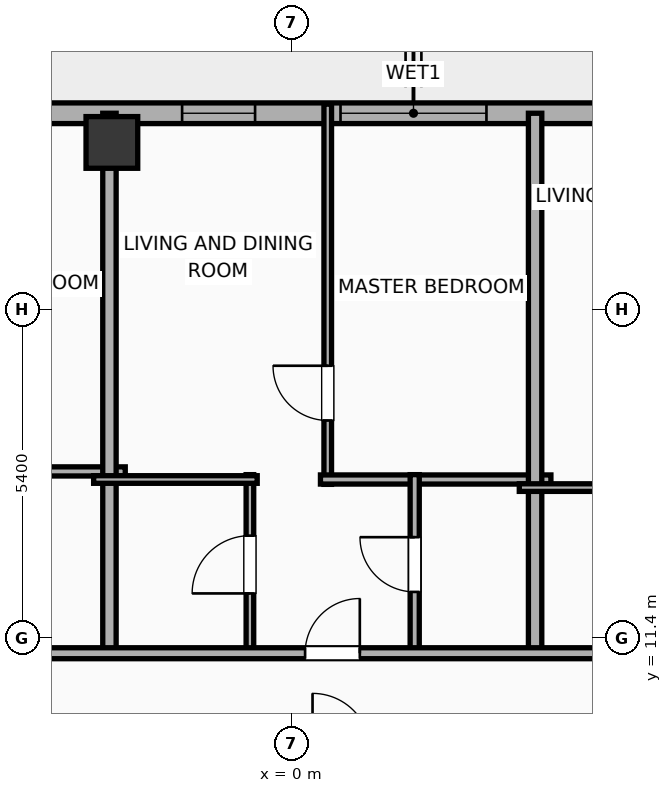
"""IFC4 building model, lengths in metres.
Left out: names, types, materials, properties, quantities, classifications, styles, units other than length and angle.
Written with IfcOpenShell. Run it as: python <this file> out.ifc"""

import sys

from ifc_helpers import new_model, si_unit, direction, frame, frame_2d, origin, origin_2d, place, context, subcontext, project, spatial, rectangle, hollow_rectangle, extrude, element, fill, save


model = new_model("IFC4")
c1 = context("Model", 3, precision=1e-05, world=origin(), true_north=direction((0.0, 1.0)))
c2 = subcontext(c1, "Body", "Model", "MODEL_VIEW")
j1 = project(units=[si_unit("LENGTHUNIT", "METRE"), si_unit("PLANEANGLEUNIT", "RADIAN")], contexts=[c1])
p1 = place(None, origin())
s1 = spatial("IfcSite", under=j1, at=p1, CompositionType="ELEMENT")
p2 = place(p1, origin())
s2 = spatial("IfcBuilding", under=s1, at=p2, CompositionType="ELEMENT")
p3 = place(p2, frame((0.0, 0.0, 231.4)))
s3 = spatial("IfcBuildingStorey", under=s2, at=p3, CompositionType="ELEMENT", Elevation=231.4)
p4 = place(p3, frame((-2.96, 19.55, 0.0), z_axis=(0.0, 0.0, 1.0), x_axis=(1.0, 0.0, 0.0)))
e1 = element("IfcColumn", 1, at=p4, inside=s3, PredefinedType="COLUMN", context=c2, shape_type="SweptSolid", body=[
    extrude(hollow_rectangle(XDim=0.85, YDim=0.85, WallThickness=0.028, at=origin_2d()), origin(), (0.0, 0.0, 1.0), 3.9),
])
p5 = place(p3, frame((-22.783, 20.03, 0.0), z_axis=(0.0, 0.0, 1.0), x_axis=(1.0, 0.0, 0.0)))
e2 = element("IfcWall", 2, at=p5, inside=s3, PredefinedType="ELEMENTEDWALL", context=c2, shape_type="SweptSolid", body=[
    extrude(rectangle(XDim=49.566, YDim=0.34, at=frame_2d((24.783, 0.0))), origin(), (0.0, 0.0, 1.0), 3.65),
])
p6 = place(p5, frame((14.12, 0.0, 0.0)))
e3 = element("IfcOpeningElement", 3, at=p6, cuts=e2, PredefinedType="OPENING", context=c2, shape_type="SweptSolid", body=[
    extrude(rectangle(XDim=1.5, YDim=2.05, at=frame_2d((0.75, 1.025))), frame((0.0, 0.18, 0.0), z_axis=(0.0, -1.0, 0.0), x_axis=(1.0, 0.0, 0.0)), (0.0, 0.0, 1.0), 0.36),
])
p7 = place(p5, frame((6.211, 0.0, 0.75)))
e4 = element("IfcOpeningElement", 4, at=p7, cuts=e2, PredefinedType="OPENING", context=c2, shape_type="SweptSolid", body=[
    extrude(rectangle(XDim=2.4, YDim=2.1, at=frame_2d((1.2, 1.05))), frame((0.0, 0.18, 0.0), z_axis=(0.0, -1.0, 0.0), x_axis=(1.0, 0.0, 0.0)), (0.0, 0.0, 1.0), 0.36),
])
p8 = place(p5, frame((23.583, 0.0, 0.75)))
e5 = element("IfcOpeningElement", 5, at=p8, cuts=e2, PredefinedType="OPENING", context=c2, shape_type="SweptSolid", body=[
    extrude(rectangle(XDim=2.4, YDim=2.1, at=frame_2d((1.2, 1.05))), frame((0.0, 0.18, 0.0), z_axis=(0.0, -1.0, 0.0), x_axis=(1.0, 0.0, 0.0)), (0.0, 0.0, 1.0), 0.36),
])
p9 = place(p5, frame((33.947, 0.0, 0.0)))
e6 = element("IfcOpeningElement", 6, at=p9, cuts=e2, PredefinedType="OPENING", context=c2, shape_type="SweptSolid", body=[
    extrude(rectangle(XDim=1.5, YDim=2.05, at=frame_2d((0.75, 1.025))), frame((0.0, 0.18, 0.0), z_axis=(0.0, -1.0, 0.0), x_axis=(1.0, 0.0, 0.0)), (0.0, 0.0, 1.0), 0.36),
])
p10 = place(p5, frame((2.36, 0.0, 0.75)))
e7 = element("IfcOpeningElement", 7, at=p10, cuts=e2, PredefinedType="OPENING", context=c2, shape_type="SweptSolid", body=[
    extrude(rectangle(XDim=1.2, YDim=2.05, at=frame_2d((0.6, 1.025))), frame((0.0, 0.18, 0.0), z_axis=(0.0, -1.0, 0.0), x_axis=(1.0, 0.0, 0.0)), (0.0, 0.0, 1.0), 0.36),
])
p11 = place(p5, frame((10.598, 0.0, 0.75)))
e8 = element("IfcOpeningElement", 8, at=p11, cuts=e2, PredefinedType="OPENING", context=c2, shape_type="SweptSolid", body=[
    extrude(rectangle(XDim=1.2, YDim=2.05, at=frame_2d((0.6, 1.025))), frame((0.0, 0.18, 0.0), z_axis=(0.0, -1.0, 0.0), x_axis=(1.0, 0.0, 0.0)), (0.0, 0.0, 1.0), 0.36),
])
p12 = place(p5, frame((17.478, 0.0, 0.75)))
e9 = element("IfcOpeningElement", 9, at=p12, cuts=e2, PredefinedType="OPENING", context=c2, shape_type="SweptSolid", body=[
    extrude(rectangle(XDim=1.2, YDim=2.05, at=frame_2d((0.6, 1.025))), frame((0.0, 0.18, 0.0), z_axis=(0.0, -1.0, 0.0), x_axis=(1.0, 0.0, 0.0)), (0.0, 0.0, 1.0), 0.36),
])
p13 = place(p5, frame((20.978, 0.0, 0.75)))
e10 = element("IfcOpeningElement", 10, at=p13, cuts=e2, PredefinedType="OPENING", context=c2, shape_type="SweptSolid", body=[
    extrude(rectangle(XDim=1.2, YDim=2.05, at=frame_2d((0.6, 1.025))), frame((0.0, 0.18, 0.0), z_axis=(0.0, -1.0, 0.0), x_axis=(1.0, 0.0, 0.0)), (0.0, 0.0, 1.0), 0.36),
])
p14 = place(p5, frame((27.758, 0.0, 0.75)))
e11 = element("IfcOpeningElement", 11, at=p14, cuts=e2, PredefinedType="OPENING", context=c2, shape_type="SweptSolid", body=[
    extrude(rectangle(XDim=1.2, YDim=2.05, at=frame_2d((0.6, 1.025))), frame((0.0, 0.18, 0.0), z_axis=(0.0, -1.0, 0.0), x_axis=(1.0, 0.0, 0.0)), (0.0, 0.0, 1.0), 0.36),
])
p15 = place(p5, frame((31.037, 0.0, 0.75)))
e12 = element("IfcOpeningElement", 12, at=p15, cuts=e2, PredefinedType="OPENING", context=c2, shape_type="SweptSolid", body=[
    extrude(rectangle(XDim=1.2, YDim=2.05, at=frame_2d((0.6, 1.025))), frame((0.0, 0.18, 0.0), z_axis=(0.0, -1.0, 0.0), x_axis=(1.0, 0.0, 0.0)), (0.0, 0.0, 1.0), 0.36),
])
p16 = place(p5, frame((37.596, 0.0, 0.75)))
e13 = element("IfcOpeningElement", 13, at=p16, cuts=e2, PredefinedType="OPENING", context=c2, shape_type="SweptSolid", body=[
    extrude(rectangle(XDim=1.2, YDim=2.05, at=frame_2d((0.6, 1.025))), frame((0.0, 0.18, 0.0), z_axis=(0.0, -1.0, 0.0), x_axis=(1.0, 0.0, 0.0)), (0.0, 0.0, 1.0), 0.36),
])
p17 = place(p5, frame((40.876, 0.0, 0.75)))
e14 = element("IfcOpeningElement", 14, at=p17, cuts=e2, PredefinedType="OPENING", context=c2, shape_type="SweptSolid", body=[
    extrude(rectangle(XDim=1.2, YDim=2.05, at=frame_2d((0.6, 1.025))), frame((0.0, 0.18, 0.0), z_axis=(0.0, -1.0, 0.0), x_axis=(1.0, 0.0, 0.0)), (0.0, 0.0, 1.0), 0.36),
])
p18 = place(p5, frame((44.156, 0.0, 0.75)))
e15 = element("IfcOpeningElement", 15, at=p18, cuts=e2, PredefinedType="OPENING", context=c2, shape_type="SweptSolid", body=[
    extrude(rectangle(XDim=1.2, YDim=2.05, at=frame_2d((0.6, 1.025))), frame((0.0, 0.18, 0.0), z_axis=(0.0, -1.0, 0.0), x_axis=(1.0, 0.0, 0.0)), (0.0, 0.0, 1.0), 0.36),
])
p19 = place(p5, frame((46.969, 0.0, 0.75)))
e16 = element("IfcOpeningElement", 16, at=p19, cuts=e2, PredefinedType="OPENING", context=c2, shape_type="SweptSolid", body=[
    extrude(rectangle(XDim=1.2, YDim=2.05, at=frame_2d((0.6, 1.025))), frame((0.0, 0.18, 0.0), z_axis=(0.0, -1.0, 0.0), x_axis=(1.0, 0.0, 0.0)), (0.0, 0.0, 1.0), 0.36),
])
p20 = place(p3, frame((-6.53, 14.14, 0.0), z_axis=(0.0, 0.0, 1.0), x_axis=(1.0, 0.0, 0.0)))
e17 = element("IfcWall", 17, at=p20, inside=s3, PredefinedType="PLUMBINGWALL", context=c2, shape_type="SweptSolid", body=[
    extrude(rectangle(XDim=3.79, YDim=0.15, at=frame_2d((1.895, 0.0))), origin(), (0.0, 0.0, 1.0), 3.65),
])
p21 = place(p3, frame((-3.0, 11.07, 0.0), z_axis=(0.0, 0.0, 1.0), x_axis=(0.0, 1.0, 0.0)))
e18 = element("IfcWall", 18, at=p21, inside=s3, PredefinedType="PARTITIONING", context=c2, shape_type="SweptSolid", body=[
    extrude(rectangle(XDim=8.96, YDim=0.22, at=frame_2d((4.48, 0.0))), origin(), (0.0, 0.0, 1.0), 3.09),
])
p22 = place(p3, frame((0.59, 13.927, 0.0), z_axis=(0.0, 0.0, 1.0), x_axis=(0.0, 1.0, 0.0)))
e19 = element("IfcWall", 19, at=p22, inside=s3, PredefinedType="PARTITIONING", context=c2, shape_type="SweptSolid", body=[
    extrude(rectangle(XDim=6.253, YDim=0.125, at=frame_2d((3.126, 0.0))), origin(), (0.0, 0.0, 1.0), 3.65),
])
p23 = place(p22, frame((1.051, 0.0, 0.0)))
e20 = element("IfcOpeningElement", 20, at=p23, cuts=e19, PredefinedType="OPENING", context=c2, shape_type="SweptSolid", body=[
    extrude(rectangle(XDim=0.9, YDim=2.05, at=frame_2d((0.45, 1.025))), frame((0.0, 0.073, 0.0), z_axis=(0.0, -1.0, 0.0), x_axis=(1.0, 0.0, 0.0)), (0.0, 0.0, 1.0), 0.145),
])
p24 = place(p3, frame((0.47, 14.007, 0.0), z_axis=(0.0, 0.0, 1.0), x_axis=(1.0, 0.0, 0.0)))
e21 = element("IfcWall", 21, at=p24, inside=s3, PredefinedType="PLUMBINGWALL", context=c2, shape_type="SweptSolid", body=[
    extrude(rectangle(XDim=3.79, YDim=0.15, at=frame_2d((1.895, 0.0))), origin(), (0.0, 0.0, 1.0), 3.65),
])
p25 = place(p3, frame((-0.69, 11.13, 0.0), z_axis=(0.0, 0.0, 1.0), x_axis=(0.0, 1.0, 0.0)))
e22 = element("IfcWall", 22, at=p25, inside=s3, PredefinedType="PARTITIONING", context=c2, shape_type="SweptSolid", body=[
    extrude(rectangle(XDim=2.957, YDim=0.125, at=frame_2d((1.479, 0.0))), origin(), (0.0, 0.0, 1.0), 3.65),
])
p26 = place(p25, frame((1.003, 0.0, 0.0)))
e23 = element("IfcOpeningElement", 23, at=p26, cuts=e22, PredefinedType="OPENING", context=c2, shape_type="SweptSolid", body=[
    extrude(rectangle(XDim=0.95, YDim=2.05, at=frame_2d((0.475, 1.025))), frame((0.0, 0.073, 0.0), z_axis=(0.0, -1.0, 0.0), x_axis=(1.0, 0.0, 0.0)), (0.0, 0.0, 1.0), 0.145),
])
p27 = place(p3, frame((-3.26, 14.007, 0.0), z_axis=(0.0, 0.0, 1.0), x_axis=(1.0, 0.0, 0.0)))
e24 = element("IfcWall", 24, at=p27, inside=s3, PredefinedType="PARTITIONING", context=c2, shape_type="SweptSolid", body=[
    extrude(rectangle(XDim=2.69, YDim=0.125, at=frame_2d((1.345, 0.0))), origin(), (0.0, 0.0, 1.0), 3.65),
])
p28 = place(p3, frame((2.02, 11.13, 0.0), z_axis=(0.0, 0.0, 1.0), x_axis=(0.0, 1.0, 0.0)))
e25 = element("IfcWall", 25, at=p28, inside=s3, PredefinedType="PLUMBINGWALL", context=c2, shape_type="SweptSolid", body=[
    extrude(rectangle(XDim=2.957, YDim=0.15, at=frame_2d((1.479, 0.0))), origin(), (0.0, 0.0, 1.0), 3.65),
])
p29 = place(p28, frame((1.029, 0.0, 0.0)))
e26 = element("IfcOpeningElement", 26, at=p29, cuts=e25, PredefinedType="OPENING", context=c2, shape_type="SweptSolid", body=[
    extrude(rectangle(XDim=0.9, YDim=2.05, at=frame_2d((0.45, 1.025))), frame((0.0, 0.085, 0.0), z_axis=(0.0, -1.0, 0.0), x_axis=(1.0, 0.0, 0.0)), (0.0, 0.0, 1.0), 0.17),
])
p30 = place(p3, frame((4.0, 11.07, 0.0), z_axis=(0.0, 0.0, 1.0), x_axis=(0.0, 1.0, 0.0)))
e27 = element("IfcWall", 27, at=p30, inside=s3, PredefinedType="PARTITIONING", context=c2, shape_type="SweptSolid", body=[
    extrude(rectangle(XDim=8.96, YDim=0.22, at=frame_2d((4.48, 0.0))), origin(), (0.0, 0.0, 1.0), 3.65),
])
p31 = place(p3, frame((3.74, 13.874, 0.0), z_axis=(0.0, 0.0, 1.0), x_axis=(1.0, 0.0, 0.0)))
e28 = element("IfcWall", 28, at=p31, inside=s3, PredefinedType="PARTITIONING", context=c2, shape_type="SweptSolid", body=[
    extrude(rectangle(XDim=2.69, YDim=0.125, at=frame_2d((1.345, 0.0))), origin(), (0.0, 0.0, 1.0), 3.65),
])
p32 = place(p3, frame((-26.23, 11.15, 0.0), z_axis=(0.0, 0.0, 1.0), x_axis=(1.0, 0.0, 0.0)))
e29 = element("IfcWall", 29, at=p32, inside=s3, PredefinedType="PARTITIONING", context=c2, shape_type="SweptSolid", body=[
    extrude(rectangle(XDim=56.46, YDim=0.18, at=frame_2d((28.23, 0.0))), origin(), (0.0, 0.0, 1.0), 3.65),
])
p33 = place(p32, frame((3.614, 0.0, 0.0)))
e30 = element("IfcOpeningElement", 30, at=p33, cuts=e29, PredefinedType="OPENING", context=c2, shape_type="SweptSolid", body=[
    extrude(rectangle(XDim=1.15, YDim=2.05, at=frame_2d((0.575, 1.025))), frame((0.0, 0.1, 0.0), z_axis=(0.0, -1.0, 0.0), x_axis=(1.0, 0.0, 0.0)), (0.0, 0.0, 1.0), 0.2),
])
p34 = place(p32, frame((11.761, 0.0, 0.0)))
e31 = element("IfcOpeningElement", 31, at=p34, cuts=e29, PredefinedType="OPENING", context=c2, shape_type="SweptSolid", body=[
    extrude(rectangle(XDim=1.15, YDim=2.05, at=frame_2d((0.575, 1.025))), frame((0.0, 0.1, 0.0), z_axis=(0.0, -1.0, 0.0), x_axis=(1.0, 0.0, 0.0)), (0.0, 0.0, 1.0), 0.2),
])
p35 = place(p32, frame((19.447, 0.0, 0.0)))
e32 = element("IfcOpeningElement", 32, at=p35, cuts=e29, PredefinedType="OPENING", context=c2, shape_type="SweptSolid", body=[
    extrude(rectangle(XDim=0.9, YDim=2.05, at=frame_2d((0.45, 1.025))), frame((0.0, 0.1, 0.0), z_axis=(0.0, -1.0, 0.0), x_axis=(1.0, 0.0, 0.0)), (0.0, 0.0, 1.0), 0.2),
])
p36 = place(p32, frame((26.448, 0.0, 0.0)))
e33 = element("IfcOpeningElement", 33, at=p36, cuts=e29, PredefinedType="OPENING", context=c2, shape_type="SweptSolid", body=[
    extrude(rectangle(XDim=0.9, YDim=2.05, at=frame_2d((0.45, 1.025))), frame((0.0, 0.1, 0.0), z_axis=(0.0, -1.0, 0.0), x_axis=(1.0, 0.0, 0.0)), (0.0, 0.0, 1.0), 0.2),
])
p37 = place(p32, frame((33.223, 0.0, 0.0)))
e34 = element("IfcOpeningElement", 34, at=p37, cuts=e29, PredefinedType="OPENING", context=c2, shape_type="SweptSolid", body=[
    extrude(rectangle(XDim=0.9, YDim=2.05, at=frame_2d((0.45, 1.025))), frame((0.0, 0.1, 0.0), z_axis=(0.0, -1.0, 0.0), x_axis=(1.0, 0.0, 0.0)), (0.0, 0.0, 1.0), 0.2),
])
p38 = place(p32, frame((39.783, 0.0, 0.0)))
e35 = element("IfcOpeningElement", 35, at=p38, cuts=e29, PredefinedType="OPENING", context=c2, shape_type="SweptSolid", body=[
    extrude(rectangle(XDim=0.9, YDim=2.05, at=frame_2d((0.45, 1.025))), frame((0.0, 0.1, 0.0), z_axis=(0.0, -1.0, 0.0), x_axis=(1.0, 0.0, 0.0)), (0.0, 0.0, 1.0), 0.2),
])
p39 = place(p32, frame((46.344, 0.0, 0.0)))
e36 = element("IfcOpeningElement", 36, at=p39, cuts=e29, PredefinedType="OPENING", context=c2, shape_type="SweptSolid", body=[
    extrude(rectangle(XDim=0.9, YDim=2.05, at=frame_2d((0.45, 1.025))), frame((0.0, 0.1, 0.0), z_axis=(0.0, -1.0, 0.0), x_axis=(1.0, 0.0, 0.0)), (0.0, 0.0, 1.0), 0.2),
])
p40 = place(p32, frame((52.933, 0.0, 0.0)))
e37 = element("IfcOpeningElement", 37, at=p40, cuts=e29, PredefinedType="OPENING", context=c2, shape_type="SweptSolid", body=[
    extrude(rectangle(XDim=0.9, YDim=2.05, at=frame_2d((0.45, 1.025))), frame((0.0, 0.1, 0.0), z_axis=(0.0, -1.0, 0.0), x_axis=(1.0, 0.0, 0.0)), (0.0, 0.0, 1.0), 0.2),
])
p41 = place(p8, origin())
e38 = element("IfcWindow", 38, at=p41, inside=s3, PartitioningType="SINGLE_PANEL", PredefinedType="WINDOW", context=c2, shape_type="SweptSolid", body=[
    extrude(rectangle(XDim=2.4, YDim=2.1, at=frame_2d((1.2, 1.05))), frame((0.0, 0.03, 0.0), z_axis=(0.0, -1.0, 0.0), x_axis=(1.0, 0.0, 0.0)), (0.0, 0.0, 1.0), 0.06),
])
fill(e5, e38)
p42 = place(p13, origin())
e39 = element("IfcWindow", 39, at=p42, inside=s3, PartitioningType="SINGLE_PANEL", PredefinedType="WINDOW", context=c2, shape_type="SweptSolid", body=[
    extrude(rectangle(XDim=1.2, YDim=2.05, at=frame_2d((0.6, 1.025))), frame((0.0, 0.03, 0.0), z_axis=(0.0, -1.0, 0.0), x_axis=(1.0, 0.0, 0.0)), (0.0, 0.0, 1.0), 0.06),
])
fill(e10, e39)
p43 = place(p23, origin())
e40 = element("IfcDoor", 40, at=p43, inside=s3, OperationType="SINGLE_SWING_RIGHT", PredefinedType="DOOR", context=c2, shape_type="SweptSolid", body=[
    extrude(rectangle(XDim=0.9, YDim=2.05, at=frame_2d((0.45, 1.025))), frame((0.0, 0.025, 0.0), z_axis=(0.0, -1.0, 0.0), x_axis=(1.0, 0.0, 0.0)), (0.0, 0.0, 1.0), 0.05),
])
fill(e20, e40)
p44 = place(p26, origin())
e41 = element("IfcDoor", 41, at=p44, inside=s3, OperationType="SINGLE_SWING_LEFT", PredefinedType="DOOR", context=c2, shape_type="SweptSolid", body=[
    extrude(rectangle(XDim=0.95, YDim=2.05, at=frame_2d((0.475, 1.025))), frame((0.0, 0.025, 0.0), z_axis=(0.0, -1.0, 0.0), x_axis=(1.0, 0.0, 0.0)), (0.0, 0.0, 1.0), 0.05),
])
fill(e23, e41)
p45 = place(p29, origin())
e42 = element("IfcDoor", 42, at=p45, inside=s3, OperationType="SINGLE_SWING_RIGHT", PredefinedType="DOOR", context=c2, shape_type="SweptSolid", body=[
    extrude(rectangle(XDim=0.9, YDim=2.05, at=frame_2d((0.45, 1.025))), frame((0.0, 0.025, 0.0), z_axis=(0.0, -1.0, 0.0), x_axis=(1.0, 0.0, 0.0)), (0.0, 0.0, 1.0), 0.05),
])
fill(e26, e42)
p46 = place(p36, origin())
e43 = element("IfcDoor", 43, at=p46, inside=s3, OperationType="SINGLE_SWING_RIGHT", PredefinedType="DOOR", context=c2, shape_type="SweptSolid", body=[
    extrude(rectangle(XDim=0.9, YDim=2.05, at=frame_2d((0.45, 1.025))), frame((0.0, 0.025, 0.0), z_axis=(0.0, -1.0, 0.0), x_axis=(1.0, 0.0, 0.0)), (0.0, 0.0, 1.0), 0.05),
])
fill(e33, e43)
save(model, sys.argv[1])
